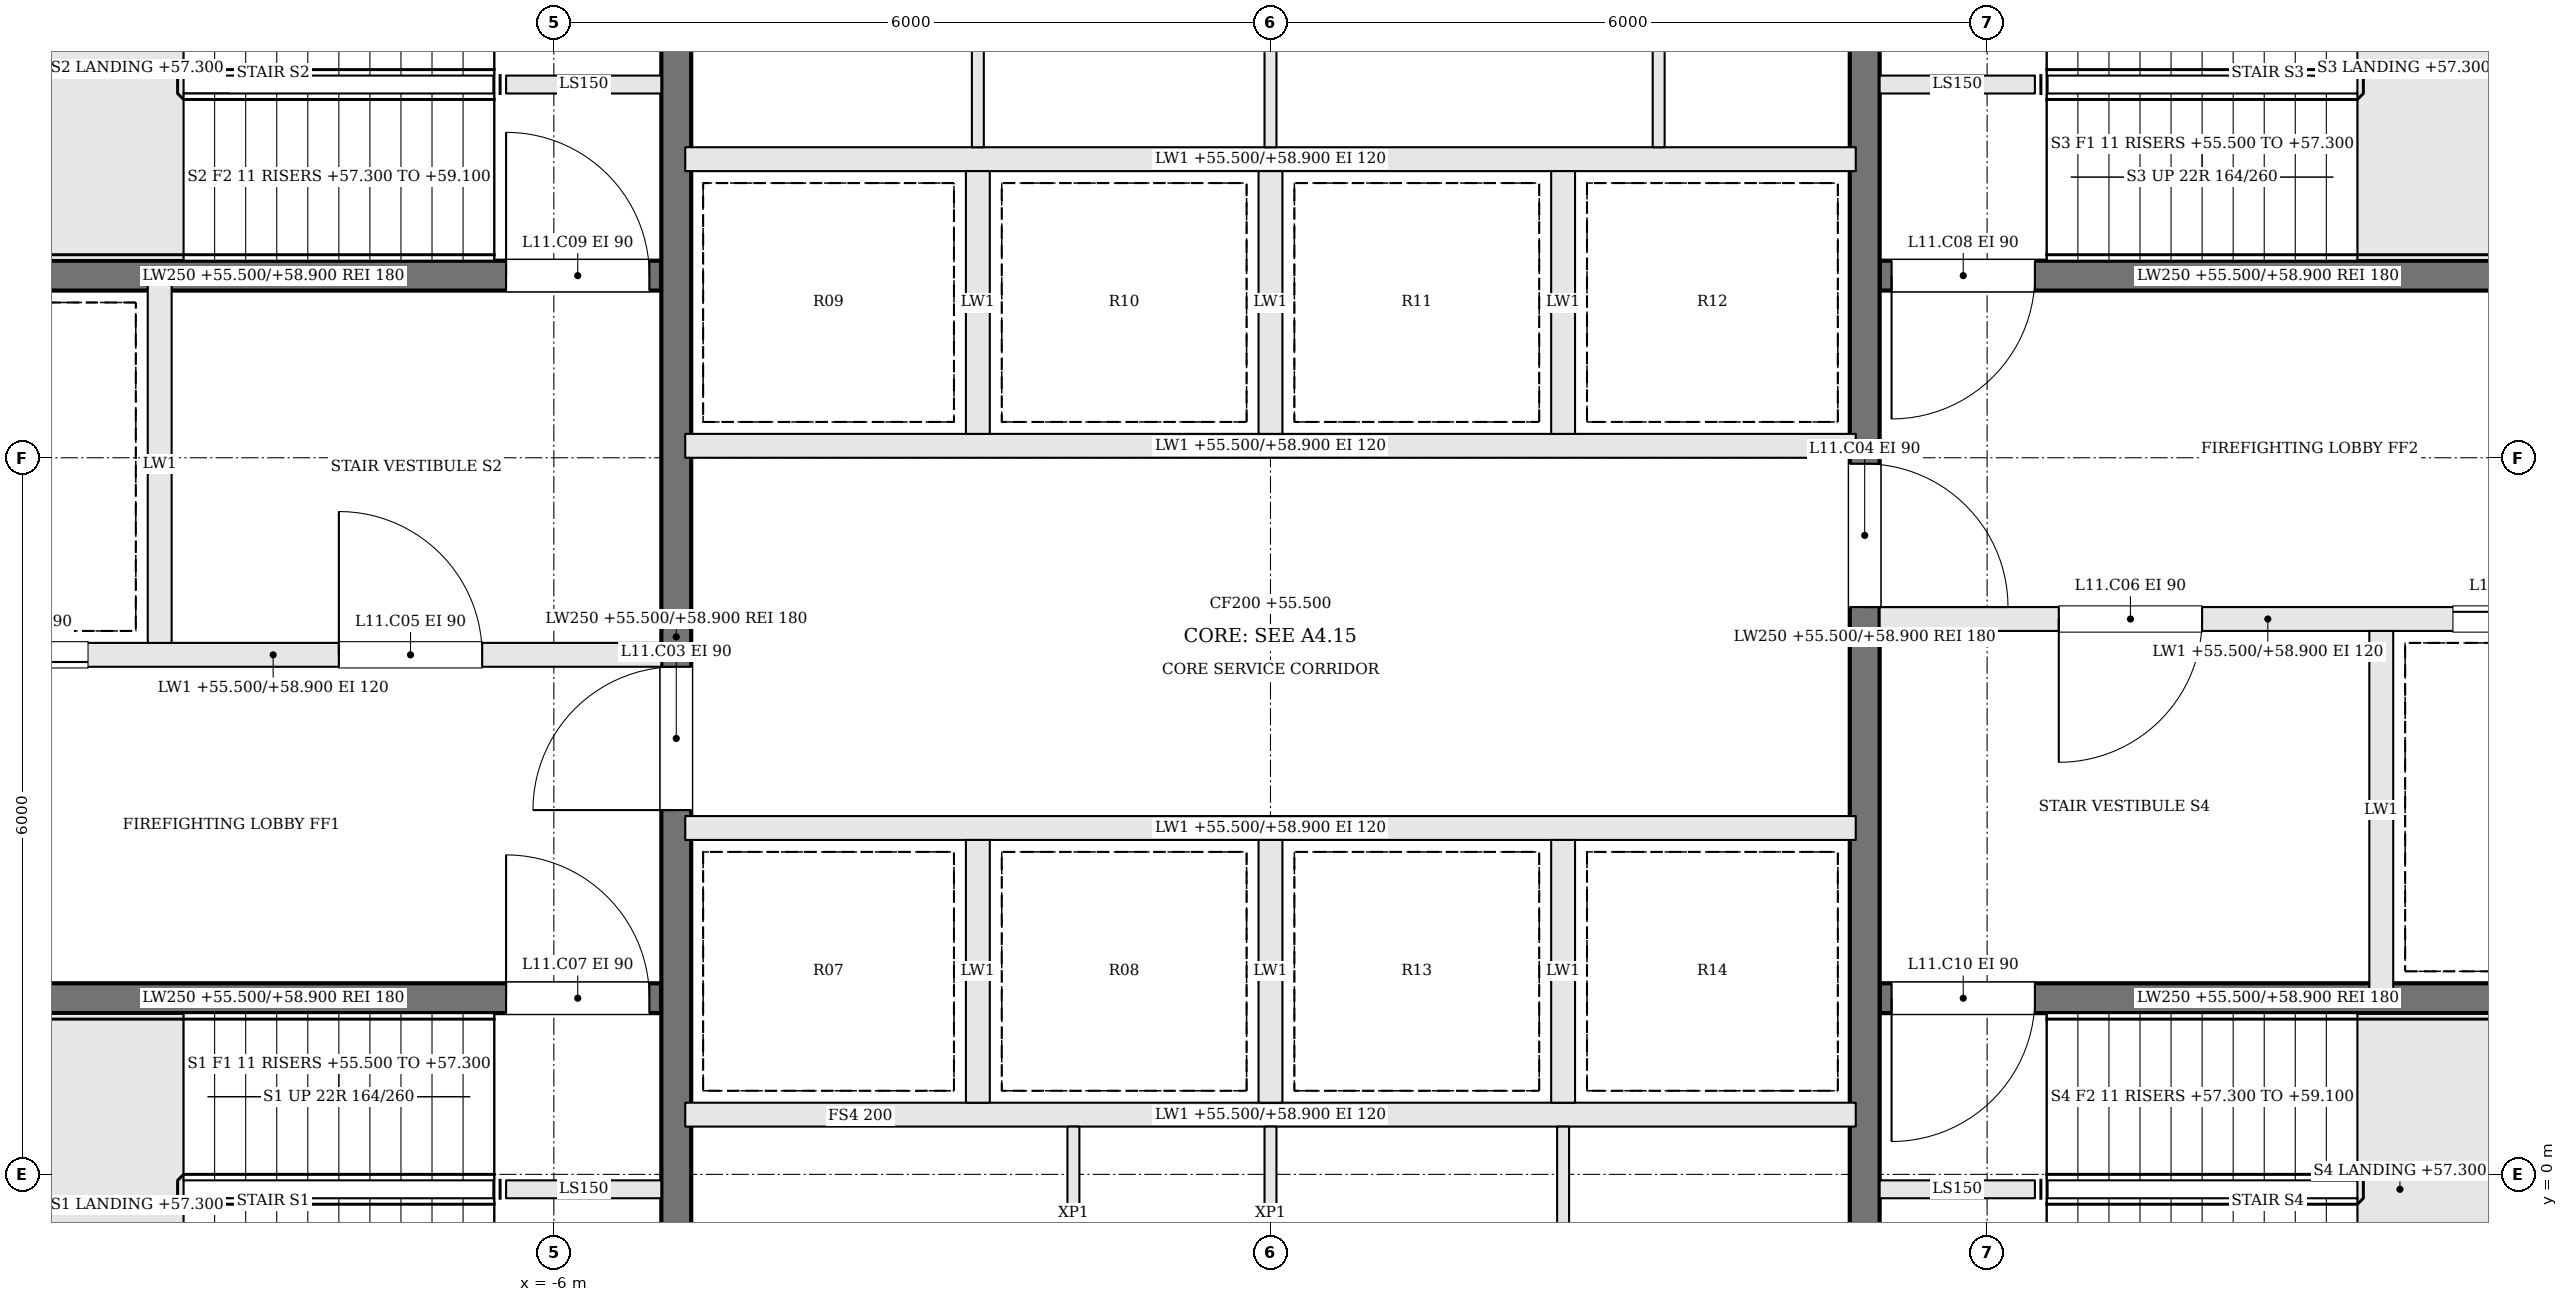
"""IFC4 building model, lengths in metres.
Left out: names, types, materials, properties, quantities, classifications, styles, units other than length and angle.
Written with IfcOpenShell. Run it as: python <this file> out.ifc"""

import sys

from ifc_helpers import new_model, si_unit, direction, frame, frame_2d, origin, place, context, subcontext, project, spatial, rectangle, extrude, element, fill, save


model = new_model("IFC4")
c1 = context("Model", 3, precision=1e-05, world=origin(), true_north=direction((0.0, 1.0)))
c2 = subcontext(c1, "Body", "Model", "MODEL_VIEW")
j1 = project(units=[si_unit("LENGTHUNIT", "METRE"), si_unit("PLANEANGLEUNIT", "RADIAN")], contexts=[c1])
p1 = place(None, origin())
s1 = spatial("IfcSite", under=j1, at=p1, CompositionType="ELEMENT")
p2 = place(p1, origin())
s2 = spatial("IfcBuilding", under=s1, at=p2, CompositionType="ELEMENT")
p3 = place(p2, frame((0.0, 0.0, 55.5)))
s3 = spatial("IfcBuildingStorey", under=s2, at=p3, CompositionType="ELEMENT", Elevation=55.5)
for number, where, z_axis, x_axis in (
    (1, (-6.4, -0.125, 0.0), (0.0, 0.0, 1.0), (1.0, 0.0, 0.0)),
    (2, (6.4, 9.125, 0.0), (0.0, 0.0, 1.0), (-1.0, 0.0, 0.0)),
    (3, (-6.4, 9.125, 0.0), (0.0, 0.0, 1.0), (1.0, 0.0, 0.0)),
    (4, (6.4, -0.125, 0.0), (0.0, 0.0, 1.0), (-1.0, 0.0, 0.0)),
):
    element("IfcWall", number, at=place(p3, frame(where, z_axis=z_axis, x_axis=x_axis)), inside=s3, PredefinedType="SOLIDWALL", context=c2, shape_type="SweptSolid", body=[
        extrude(rectangle(XDim=1.3, YDim=0.15, at=frame_2d((0.65, 0.0))), origin(), (0.0, 0.0, 1.0), 3.4),
    ])
p4 = place(p3, frame((-11.6, 1.475, 0.0), z_axis=(0.0, 0.0, 1.0), x_axis=(1.0, 0.0, 0.0)))
e5 = element("IfcWall", 5, at=p4, inside=s3, PredefinedType="SOLIDWALL", context=c2, shape_type="SweptSolid", body=[
    extrude(rectangle(XDim=6.5, YDim=0.25, at=frame_2d((3.25, 0.0))), origin(), (0.0, 0.0, 1.0), 3.4),
])
p5 = place(p4, frame((5.2, 0.0, 0.0)))
e6 = element("IfcOpeningElement", 6, at=p5, cuts=e5, PredefinedType="OPENING", context=c2, shape_type="SweptSolid", body=[
    extrude(rectangle(XDim=1.2, YDim=2.1, at=frame_2d((0.6, 1.05))), frame((0.0, 0.135, 0.0), z_axis=(0.0, -1.0, 0.0), x_axis=(1.0, 0.0, 0.0)), (0.0, 0.0, 1.0), 0.27),
])
p6 = place(p3, frame((11.6, 7.525, 0.0), z_axis=(0.0, 0.0, 1.0), x_axis=(-1.0, 0.0, 0.0)))
e7 = element("IfcWall", 7, at=p6, inside=s3, PredefinedType="SOLIDWALL", context=c2, shape_type="SweptSolid", body=[
    extrude(rectangle(XDim=6.5, YDim=0.25, at=frame_2d((3.25, 0.0))), origin(), (0.0, 0.0, 1.0), 3.4),
])
p7 = place(p6, frame((5.2, 0.0, 0.0)))
e8 = element("IfcOpeningElement", 8, at=p7, cuts=e7, PredefinedType="OPENING", context=c2, shape_type="SweptSolid", body=[
    extrude(rectangle(XDim=1.2, YDim=2.1, at=frame_2d((0.6, 1.05))), frame((0.0, 0.135, 0.0), z_axis=(0.0, -1.0, 0.0), x_axis=(1.0, 0.0, 0.0)), (0.0, 0.0, 1.0), 0.27),
])
p8 = place(p3, frame((-11.6, 4.35, 0.0), z_axis=(0.0, 0.0, 1.0), x_axis=(1.0, 0.0, 0.0)))
e9 = element("IfcWall", 9, at=p8, inside=s3, PredefinedType="SOLIDWALL", context=c2, shape_type="SweptSolid", body=[
    extrude(rectangle(XDim=6.5, YDim=0.2, at=frame_2d((3.25, 0.0))), origin(), (0.0, 0.0, 1.0), 3.4),
])
p9 = place(p8, frame((3.8, 0.0, 0.0)))
e10 = element("IfcOpeningElement", 10, at=p9, cuts=e9, PredefinedType="OPENING", context=c2, shape_type="SweptSolid", body=[
    extrude(rectangle(XDim=1.2, YDim=2.1, at=frame_2d((0.6, 1.05))), frame((0.0, 0.11, 0.0), z_axis=(0.0, -1.0, 0.0), x_axis=(1.0, 0.0, 0.0)), (0.0, 0.0, 1.0), 0.22),
])
p10 = place(p8, frame((0.5, 0.0, 0.0)))
e11 = element("IfcOpeningElement", 11, at=p10, cuts=e9, PredefinedType="OPENING", context=c2, shape_type="SweptSolid", body=[
    extrude(rectangle(XDim=1.2, YDim=2.1, at=frame_2d((0.6, 1.05))), frame((0.0, 0.11, 0.0), z_axis=(0.0, -1.0, 0.0), x_axis=(1.0, 0.0, 0.0)), (0.0, 0.0, 1.0), 0.22),
])
p11 = place(p3, frame((11.6, 4.65, 0.0), z_axis=(0.0, 0.0, 1.0), x_axis=(-1.0, 0.0, 0.0)))
e12 = element("IfcWall", 12, at=p11, inside=s3, PredefinedType="SOLIDWALL", context=c2, shape_type="SweptSolid", body=[
    extrude(rectangle(XDim=6.5, YDim=0.2, at=frame_2d((3.25, 0.0))), origin(), (0.0, 0.0, 1.0), 3.4),
])
p12 = place(p11, frame((3.8, 0.0, 0.0)))
e13 = element("IfcOpeningElement", 13, at=p12, cuts=e12, PredefinedType="OPENING", context=c2, shape_type="SweptSolid", body=[
    extrude(rectangle(XDim=1.2, YDim=2.1, at=frame_2d((0.6, 1.05))), frame((0.0, 0.11, 0.0), z_axis=(0.0, -1.0, 0.0), x_axis=(1.0, 0.0, 0.0)), (0.0, 0.0, 1.0), 0.22),
])
p13 = place(p11, frame((0.5, 0.0, 0.0)))
e14 = element("IfcOpeningElement", 14, at=p13, cuts=e12, PredefinedType="OPENING", context=c2, shape_type="SweptSolid", body=[
    extrude(rectangle(XDim=1.2, YDim=2.1, at=frame_2d((0.6, 1.05))), frame((0.0, 0.11, 0.0), z_axis=(0.0, -1.0, 0.0), x_axis=(1.0, 0.0, 0.0)), (0.0, 0.0, 1.0), 0.22),
])
p14 = place(p3, frame((-11.6, 7.525, 0.0), z_axis=(0.0, 0.0, 1.0), x_axis=(1.0, 0.0, 0.0)))
e15 = element("IfcWall", 15, at=p14, inside=s3, PredefinedType="SOLIDWALL", context=c2, shape_type="SweptSolid", body=[
    extrude(rectangle(XDim=6.5, YDim=0.25, at=frame_2d((3.25, 0.0))), origin(), (0.0, 0.0, 1.0), 3.4),
])
p15 = place(p14, frame((5.2, 0.0, 0.0)))
e16 = element("IfcOpeningElement", 16, at=p15, cuts=e15, PredefinedType="OPENING", context=c2, shape_type="SweptSolid", body=[
    extrude(rectangle(XDim=1.2, YDim=2.1, at=frame_2d((0.6, 1.05))), frame((0.0, 0.135, 0.0), z_axis=(0.0, -1.0, 0.0), x_axis=(1.0, 0.0, 0.0)), (0.0, 0.0, 1.0), 0.27),
])
p16 = place(p3, frame((11.6, 1.475, 0.0), z_axis=(0.0, 0.0, 1.0), x_axis=(-1.0, 0.0, 0.0)))
e17 = element("IfcWall", 17, at=p16, inside=s3, PredefinedType="SOLIDWALL", context=c2, shape_type="SweptSolid", body=[
    extrude(rectangle(XDim=6.5, YDim=0.25, at=frame_2d((3.25, 0.0))), origin(), (0.0, 0.0, 1.0), 3.4),
])
p17 = place(p16, frame((5.2, 0.0, 0.0)))
e18 = element("IfcOpeningElement", 18, at=p17, cuts=e17, PredefinedType="OPENING", context=c2, shape_type="SweptSolid", body=[
    extrude(rectangle(XDim=1.2, YDim=2.1, at=frame_2d((0.6, 1.05))), frame((0.0, 0.135, 0.0), z_axis=(0.0, -1.0, 0.0), x_axis=(1.0, 0.0, 0.0)), (0.0, 0.0, 1.0), 0.27),
])
for number, where, z_axis, x_axis in (
    (19, (-9.3, 4.45, 0.0), (0.0, 0.0, 1.0), (0.0, 1.0, 0.0)),
    (20, (9.3, 4.55, 0.0), (0.0, 0.0, 1.0), (0.0, -1.0, 0.0)),
):
    element("IfcWall", number, at=place(p3, frame(where, z_axis=z_axis, x_axis=x_axis)), inside=s3, PredefinedType="SOLIDWALL", context=c2, shape_type="SweptSolid", body=[
        extrude(rectangle(XDim=3.0, YDim=0.2, at=frame_2d((1.5, 0.0))), origin(), (0.0, 0.0, 1.0), 3.4),
    ])
p18 = place(p3, frame((-4.975, -1.6, 0.0), z_axis=(0.0, 0.0, 1.0), x_axis=(0.0, 1.0, 0.0)))
e21 = element("IfcWall", 21, at=p18, inside=s3, PredefinedType="SOLIDWALL", context=c2, shape_type="SweptSolid", body=[
    extrude(rectangle(XDim=12.2, YDim=0.25, at=frame_2d((6.1, 0.0))), origin(), (0.0, 0.0, 1.0), 3.4),
])
p19 = place(p18, frame((4.65, 0.0, 0.0)))
e22 = element("IfcOpeningElement", 22, at=p19, cuts=e21, PredefinedType="OPENING", context=c2, shape_type="SweptSolid", body=[
    extrude(rectangle(XDim=1.2, YDim=2.1, at=frame_2d((0.6, 1.05))), frame((0.0, 0.135, 0.0), z_axis=(0.0, -1.0, 0.0), x_axis=(1.0, 0.0, 0.0)), (0.0, 0.0, 1.0), 0.27),
])
p20 = place(p3, frame((4.975, 10.6, 0.0), z_axis=(0.0, 0.0, 1.0), x_axis=(0.0, -1.0, 0.0)))
e23 = element("IfcWall", 23, at=p20, inside=s3, PredefinedType="SOLIDWALL", context=c2, shape_type="SweptSolid", body=[
    extrude(rectangle(XDim=12.2, YDim=0.25, at=frame_2d((6.1, 0.0))), origin(), (0.0, 0.0, 1.0), 3.4),
])
p21 = place(p20, frame((4.65, 0.0, 0.0)))
e24 = element("IfcOpeningElement", 24, at=p21, cuts=e23, PredefinedType="OPENING", context=c2, shape_type="SweptSolid", body=[
    extrude(rectangle(XDim=1.2, YDim=2.1, at=frame_2d((0.6, 1.05))), frame((0.0, 0.135, 0.0), z_axis=(0.0, -1.0, 0.0), x_axis=(1.0, 0.0, 0.0)), (0.0, 0.0, 1.0), 0.27),
])
for number, where, z_axis, x_axis in (
    (25, (-4.9, 0.5, 0.0), (0.0, 0.0, 1.0), (1.0, 0.0, 0.0)),
    (26, (-4.9, 2.9, 0.0), (0.0, 0.0, 1.0), (1.0, 0.0, 0.0)),
    (27, (-4.9, 6.1, 0.0), (0.0, 0.0, 1.0), (1.0, 0.0, 0.0)),
    (28, (-4.9, 8.5, 0.0), (0.0, 0.0, 1.0), (1.0, 0.0, 0.0)),
):
    element("IfcWall", number, at=place(p3, frame(where, z_axis=z_axis, x_axis=x_axis)), inside=s3, PredefinedType="SOLIDWALL", context=c2, shape_type="SweptSolid", body=[
        extrude(rectangle(XDim=9.8, YDim=0.2, at=frame_2d((4.9, 0.0))), origin(), (0.0, 0.0, 1.0), 3.4),
    ])
for number, where, z_axis, x_axis in (
    (29, (-2.45, 0.6, 0.0), (0.0, 0.0, 1.0), (0.0, 1.0, 0.0)),
    (30, (0.0, 0.6, 0.0), (0.0, 0.0, 1.0), (0.0, 1.0, 0.0)),
    (31, (2.45, 0.6, 0.0), (0.0, 0.0, 1.0), (0.0, 1.0, 0.0)),
    (32, (-2.45, 6.2, 0.0), (0.0, 0.0, 1.0), (0.0, 1.0, 0.0)),
    (33, (0.0, 6.2, 0.0), (0.0, 0.0, 1.0), (0.0, 1.0, 0.0)),
    (34, (2.45, 6.2, 0.0), (0.0, 0.0, 1.0), (0.0, 1.0, 0.0)),
):
    element("IfcWall", number, at=place(p3, frame(where, z_axis=z_axis, x_axis=x_axis)), inside=s3, PredefinedType="SOLIDWALL", context=c2, shape_type="SweptSolid", body=[
        extrude(rectangle(XDim=2.2, YDim=0.2, at=frame_2d((1.1, 0.0))), origin(), (0.0, 0.0, 1.0), 3.4),
    ])
for number, where, z_axis, x_axis in (
    (35, (-1.65, -1.6, 0.0), (0.0, 0.0, 1.0), (0.0, 1.0, 0.0)),
    (36, (0.0, -1.6, 0.0), (0.0, 0.0, 1.0), (0.0, 1.0, 0.0)),
    (37, (2.45, -1.6, 0.0), (0.0, 0.0, 1.0), (0.0, 1.0, 0.0)),
    (38, (-2.45, 8.6, 0.0), (0.0, 0.0, 1.0), (0.0, 1.0, 0.0)),
    (39, (0.0, 8.6, 0.0), (0.0, 0.0, 1.0), (0.0, 1.0, 0.0)),
    (40, (3.25, 8.6, 0.0), (0.0, 0.0, 1.0), (0.0, 1.0, 0.0)),
):
    element("IfcWall", number, at=place(p3, frame(where, z_axis=z_axis, x_axis=x_axis)), inside=s3, PredefinedType="PARTITIONING", context=c2, shape_type="SweptSolid", body=[
        extrude(rectangle(XDim=2.0, YDim=0.1, at=frame_2d((1.0, 0.0))), origin(), (0.0, 0.0, 1.0), 3.4),
    ])
p22 = place(p19, origin())
e41 = element("IfcDoor", 41, at=p22, inside=s3, OperationType="SINGLE_SWING_LEFT", PredefinedType="DOOR", context=c2, shape_type="SweptSolid", body=[
    extrude(rectangle(XDim=1.2, YDim=2.1, at=frame_2d((0.6, 1.05))), frame((0.0, 0.025, 0.0), z_axis=(0.0, -1.0, 0.0), x_axis=(1.0, 0.0, 0.0)), (0.0, 0.0, 1.0), 0.05),
])
fill(e22, e41)
p23 = place(p21, origin())
e42 = element("IfcDoor", 42, at=p23, inside=s3, OperationType="SINGLE_SWING_RIGHT", PredefinedType="DOOR", context=c2, shape_type="SweptSolid", body=[
    extrude(rectangle(XDim=1.2, YDim=2.1, at=frame_2d((0.6, 1.05))), frame((0.0, 0.025, 0.0), z_axis=(0.0, -1.0, 0.0), x_axis=(1.0, 0.0, 0.0)), (0.0, 0.0, 1.0), 0.05),
])
fill(e24, e42)
p24 = place(p9, origin())
e43 = element("IfcDoor", 43, at=p24, inside=s3, OperationType="SINGLE_SWING_LEFT", PredefinedType="DOOR", context=c2, shape_type="SweptSolid", body=[
    extrude(rectangle(XDim=1.2, YDim=2.1, at=frame_2d((0.6, 1.05))), frame((0.0, 0.025, 0.0), z_axis=(0.0, -1.0, 0.0), x_axis=(1.0, 0.0, 0.0)), (0.0, 0.0, 1.0), 0.05),
])
fill(e10, e43)
p25 = place(p12, origin())
e44 = element("IfcDoor", 44, at=p25, inside=s3, OperationType="SINGLE_SWING_RIGHT", PredefinedType="DOOR", context=c2, shape_type="SweptSolid", body=[
    extrude(rectangle(XDim=1.2, YDim=2.1, at=frame_2d((0.6, 1.05))), frame((0.0, 0.025, 0.0), z_axis=(0.0, -1.0, 0.0), x_axis=(1.0, 0.0, 0.0)), (0.0, 0.0, 1.0), 0.05),
])
fill(e13, e44)
p26 = place(p5, origin())
e45 = element("IfcDoor", 45, at=p26, inside=s3, OperationType="SINGLE_SWING_LEFT", PredefinedType="DOOR", context=c2, shape_type="SweptSolid", body=[
    extrude(rectangle(XDim=1.2, YDim=2.1, at=frame_2d((0.6, 1.05))), frame((0.0, 0.025, 0.0), z_axis=(0.0, -1.0, 0.0), x_axis=(1.0, 0.0, 0.0)), (0.0, 0.0, 1.0), 0.05),
])
fill(e6, e45)
p27 = place(p7, origin())
e46 = element("IfcDoor", 46, at=p27, inside=s3, OperationType="SINGLE_SWING_RIGHT", PredefinedType="DOOR", context=c2, shape_type="SweptSolid", body=[
    extrude(rectangle(XDim=1.2, YDim=2.1, at=frame_2d((0.6, 1.05))), frame((0.0, 0.025, 0.0), z_axis=(0.0, -1.0, 0.0), x_axis=(1.0, 0.0, 0.0)), (0.0, 0.0, 1.0), 0.05),
])
fill(e8, e46)
p28 = place(p15, origin())
e47 = element("IfcDoor", 47, at=p28, inside=s3, OperationType="SINGLE_SWING_LEFT", PredefinedType="DOOR", context=c2, shape_type="SweptSolid", body=[
    extrude(rectangle(XDim=1.2, YDim=2.1, at=frame_2d((0.6, 1.05))), frame((0.0, 0.025, 0.0), z_axis=(0.0, -1.0, 0.0), x_axis=(1.0, 0.0, 0.0)), (0.0, 0.0, 1.0), 0.05),
])
fill(e16, e47)
p29 = place(p17, origin())
e48 = element("IfcDoor", 48, at=p29, inside=s3, OperationType="SINGLE_SWING_RIGHT", PredefinedType="DOOR", context=c2, shape_type="SweptSolid", body=[
    extrude(rectangle(XDim=1.2, YDim=2.1, at=frame_2d((0.6, 1.05))), frame((0.0, 0.025, 0.0), z_axis=(0.0, -1.0, 0.0), x_axis=(1.0, 0.0, 0.0)), (0.0, 0.0, 1.0), 0.05),
])
fill(e18, e48)
p30 = place(p10, origin())
e49 = element("IfcDoor", 49, at=p30, inside=s3, OperationType="SLIDING_TO_RIGHT", PredefinedType="DOOR", context=c2, shape_type="SweptSolid", body=[
    extrude(rectangle(XDim=1.2, YDim=2.1, at=frame_2d((0.6, 1.05))), frame((0.0, 0.025, 0.0), z_axis=(0.0, -1.0, 0.0), x_axis=(1.0, 0.0, 0.0)), (0.0, 0.0, 1.0), 0.05),
])
fill(e11, e49)
p31 = place(p13, origin())
e50 = element("IfcDoor", 50, at=p31, inside=s3, OperationType="SLIDING_TO_RIGHT", PredefinedType="DOOR", context=c2, shape_type="SweptSolid", body=[
    extrude(rectangle(XDim=1.2, YDim=2.1, at=frame_2d((0.6, 1.05))), frame((0.0, 0.025, 0.0), z_axis=(0.0, -1.0, 0.0), x_axis=(1.0, 0.0, 0.0)), (0.0, 0.0, 1.0), 0.05),
])
fill(e14, e50)
save(model, sys.argv[1])
